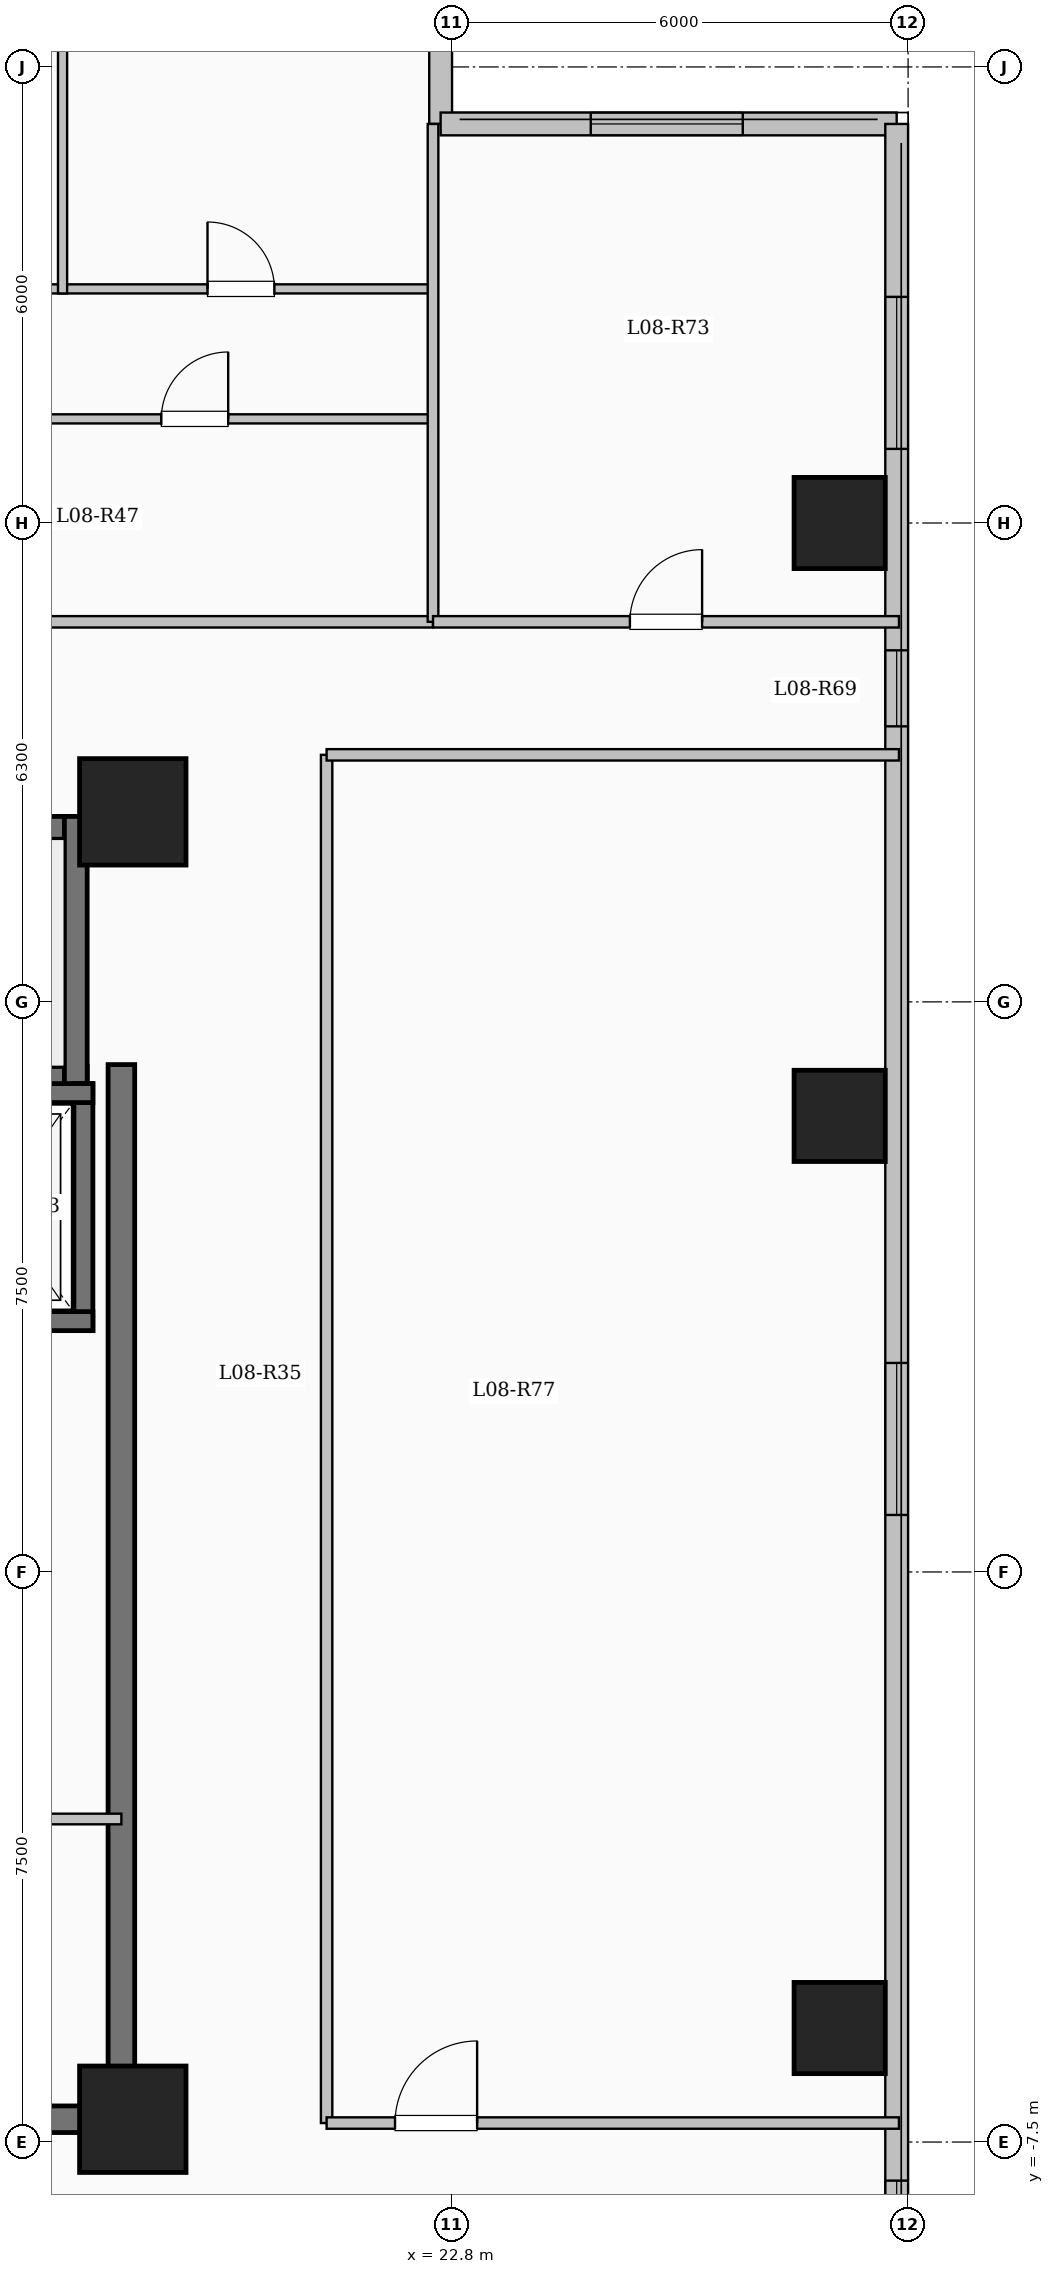
"""IFC4 building model, lengths in metres.
Left out: names, types, materials, properties, quantities, classifications, styles, units other than length and angle.
Written with IfcOpenShell. Run it as: python <this file> out.ifc"""

import sys

from ifc_helpers import new_model, si_unit, direction, frame, frame_2d, origin, origin_2d, place, context, subcontext, project, spatial, rectangle, extrude, element, fill, save


model = new_model("IFC4")
c1 = context("Model", 3, precision=1e-05, world=origin(), true_north=direction((0.0, 1.0)))
c2 = subcontext(c1, "Body", "Model", "MODEL_VIEW")
j1 = project(units=[si_unit("LENGTHUNIT", "METRE"), si_unit("PLANEANGLEUNIT", "RADIAN")], contexts=[c1])
p1 = place(None, origin())
s1 = spatial("IfcSite", under=j1, at=p1, CompositionType="ELEMENT")
p2 = place(p1, origin())
s2 = spatial("IfcBuilding", under=s1, at=p2, CompositionType="ELEMENT")
p3 = place(p2, frame((0.0, 0.0, 34.05)))
s3 = spatial("IfcBuildingStorey", under=s2, at=p3, CompositionType="ELEMENT", Elevation=34.05)
for number, where, z_axis, x_axis in (
    (1, (18.6, -7.2, 0.0), (0.0, 0.0, 1.0), (1.0, 0.0, 0.0)),
    (2, (18.6, 10.0, 0.0), (0.0, 0.0, 1.0), (1.0, 0.0, 0.0)),
):
    element("IfcColumn", number, at=place(p3, frame(where, z_axis=z_axis, x_axis=x_axis)), inside=s3, PredefinedType="COLUMN", context=c2, shape_type="SweptSolid", body=[
        extrude(rectangle(XDim=1.4, YDim=1.4, at=origin_2d()), origin(), (0.0, 0.0, 1.0), 3.35),
    ])
for number, where, z_axis, x_axis in (
    (3, (27.9, -6.0, 0.0), (0.0, 0.0, 1.0), (1.0, 0.0, 0.0)),
    (4, (27.9, 6.0, 0.0), (0.0, 0.0, 1.0), (1.0, 0.0, 0.0)),
    (5, (27.9, 13.8, 0.0), (0.0, 0.0, 1.0), (1.0, 0.0, 0.0)),
):
    element("IfcColumn", number, at=place(p3, frame(where, z_axis=z_axis, x_axis=x_axis)), inside=s3, PredefinedType="COLUMN", context=c2, shape_type="SweptSolid", body=[
        extrude(rectangle(XDim=1.2, YDim=1.2, at=origin_2d()), origin(), (0.0, 0.0, 1.0), 3.35),
    ])
p4 = place(p3, frame((22.65, 23.55, 0.0), z_axis=(0.0, 0.0, 1.0), x_axis=(0.0, -1.0, 0.0)))
e6 = element("IfcWall", 6, at=p4, inside=s3, PredefinedType="SOLIDWALL", context=c2, shape_type="SweptSolid", body=[
    extrude(rectangle(XDim=4.5, YDim=0.3, at=frame_2d((2.25, 0.0))), origin(), (0.0, 0.0, 1.0), 3.1),
])
p5 = place(p4, frame((1.367, 0.0, 0.9)))
e7 = element("IfcOpeningElement", 7, at=p5, cuts=e6, PredefinedType="OPENING", context=c2, shape_type="SweptSolid", body=[
    extrude(rectangle(XDim=1.8, YDim=1.65, at=frame_2d((0.9, 0.825))), frame((0.0, 0.16, 0.0), z_axis=(0.0, -1.0, 0.0), x_axis=(1.0, 0.0, 0.0)), (0.0, 0.0, 1.0), 0.32),
])
p6 = place(p3, frame((22.65, 19.05, 0.0), z_axis=(0.0, 0.0, 1.0), x_axis=(1.0, 0.0, 0.0)))
e8 = element("IfcWall", 8, at=p6, inside=s3, PredefinedType="SOLIDWALL", context=c2, shape_type="SweptSolid", body=[
    extrude(rectangle(XDim=6.0, YDim=0.3, at=frame_2d((3.0, 0.0))), origin(), (0.0, 0.0, 1.0), 3.1),
])
p7 = place(p6, frame((1.975, 0.0, 0.9)))
e9 = element("IfcOpeningElement", 9, at=p7, cuts=e8, PredefinedType="OPENING", context=c2, shape_type="SweptSolid", body=[
    extrude(rectangle(XDim=2.0, YDim=1.7, at=frame_2d((1.0, 0.85))), frame((0.0, 0.16, 0.0), z_axis=(0.0, -1.0, 0.0), x_axis=(1.0, 0.0, 0.0)), (0.0, 0.0, 1.0), 0.32),
])
p8 = place(p3, frame((28.65, 19.05, 0.0), z_axis=(0.0, 0.0, 1.0), x_axis=(0.0, -1.0, 0.0)))
e10 = element("IfcWall", 10, at=p8, inside=s3, PredefinedType="SOLIDWALL", context=c2, shape_type="SweptSolid", body=[
    extrude(rectangle(XDim=38.1, YDim=0.3, at=frame_2d((19.05, 0.0))), origin(), (0.0, 0.0, 1.0), 3.1),
])
p9 = place(p8, frame((2.275, 0.0, 0.9)))
e11 = element("IfcOpeningElement", 11, at=p9, cuts=e10, PredefinedType="OPENING", context=c2, shape_type="SweptSolid", body=[
    extrude(rectangle(XDim=2.0, YDim=1.7, at=frame_2d((1.0, 0.85))), frame((0.0, 0.16, 0.0), z_axis=(0.0, -1.0, 0.0), x_axis=(1.0, 0.0, 0.0)), (0.0, 0.0, 1.0), 0.32),
])
p10 = place(p8, frame((6.925, 0.0, 0.95)))
e12 = element("IfcOpeningElement", 12, at=p10, cuts=e10, PredefinedType="OPENING", context=c2, shape_type="SweptSolid", body=[
    extrude(rectangle(XDim=1.0, YDim=1.5, at=frame_2d((0.5, 0.75))), frame((0.0, 0.16, 0.0), z_axis=(0.0, -1.0, 0.0), x_axis=(1.0, 0.0, 0.0)), (0.0, 0.0, 1.0), 0.32),
])
p11 = place(p8, frame((16.3, 0.0, 0.9)))
e13 = element("IfcOpeningElement", 13, at=p11, cuts=e10, PredefinedType="OPENING", context=c2, shape_type="SweptSolid", body=[
    extrude(rectangle(XDim=2.0, YDim=1.7, at=frame_2d((1.0, 0.85))), frame((0.0, 0.16, 0.0), z_axis=(0.0, -1.0, 0.0), x_axis=(1.0, 0.0, 0.0)), (0.0, 0.0, 1.0), 0.32),
])
p12 = place(p8, frame((27.058, 0.0, 0.9)))
e14 = element("IfcOpeningElement", 14, at=p12, cuts=e10, PredefinedType="OPENING", context=c2, shape_type="SweptSolid", body=[
    extrude(rectangle(XDim=1.5, YDim=1.65, at=frame_2d((0.75, 0.825))), frame((0.0, 0.16, 0.0), z_axis=(0.0, -1.0, 0.0), x_axis=(1.0, 0.0, 0.0)), (0.0, 0.0, 1.0), 0.32),
])
p13 = place(p8, frame((32.55, 0.0, 0.9)))
e15 = element("IfcOpeningElement", 15, at=p13, cuts=e10, PredefinedType="OPENING", context=c2, shape_type="SweptSolid", body=[
    extrude(rectangle(XDim=2.4, YDim=1.8, at=frame_2d((1.2, 0.9))), frame((0.0, 0.16, 0.0), z_axis=(0.0, -1.0, 0.0), x_axis=(1.0, 0.0, 0.0)), (0.0, 0.0, 1.0), 0.32),
])
p14 = place(p3, frame((10.0, 9.79, 0.0), z_axis=(0.0, 0.0, 1.0), x_axis=(1.0, 0.0, 0.0)))
e16 = element("IfcWall", 16, at=p14, inside=s3, PredefinedType="SHEAR", context=c2, shape_type="SweptSolid", body=[
    extrude(rectangle(XDim=8.0, YDim=0.3, at=frame_2d((4.0, 0.0))), origin(), (0.0, 0.0, 1.0), 3.35),
])
p15 = place(p3, frame((10.0, 6.5, 0.0), z_axis=(0.0, 0.0, 1.0), x_axis=(1.0, 0.0, 0.0)))
e17 = element("IfcWall", 17, at=p15, inside=s3, PredefinedType="SHEAR", context=c2, shape_type="SweptSolid", body=[
    extrude(rectangle(XDim=8.0, YDim=0.3, at=frame_2d((4.0, 0.0))), origin(), (0.0, 0.0, 1.0), 3.35),
])
p16 = place(p15, frame((0.55, 0.0, 0.0)))
e18 = element("IfcOpeningElement", 18, at=p16, cuts=e17, PredefinedType="OPENING", context=c2, shape_type="SweptSolid", body=[
    extrude(rectangle(XDim=1.0, YDim=2.15, at=frame_2d((0.5, 1.075))), frame((0.0, 0.16, 0.0), z_axis=(0.0, -1.0, 0.0), x_axis=(1.0, 0.0, 0.0)), (0.0, 0.0, 1.0), 0.32),
])
p17 = place(p3, frame((17.85, 6.35, 0.0), z_axis=(0.0, 0.0, 1.0), x_axis=(0.0, 1.0, 0.0)))
e19 = element("IfcWall", 19, at=p17, inside=s3, PredefinedType="SHEAR", context=c2, shape_type="SweptSolid", body=[
    extrude(rectangle(XDim=3.59, YDim=0.3, at=frame_2d((1.795, 0.0))), origin(), (0.0, 0.0, 1.0), 3.35),
])
p18 = place(p3, frame((17.95, 3.175, 0.0), z_axis=(0.0, 0.0, 1.0), x_axis=(0.0, 1.0, 0.0)))
e20 = element("IfcWall", 20, at=p18, inside=s3, PredefinedType="SHEAR", context=c2, shape_type="SweptSolid", body=[
    extrude(rectangle(XDim=3.25, YDim=0.25, at=frame_2d((1.625, 0.0))), origin(), (0.0, 0.0, 1.0), 3.35),
])
for number, where, z_axis, x_axis in (
    (21, (15.525, 3.3, 0.0), (0.0, 0.0, 1.0), (1.0, 0.0, 0.0)),
    (22, (15.525, 6.3, 0.0), (0.0, 0.0, 1.0), (1.0, 0.0, 0.0)),
):
    element("IfcWall", number, at=place(p3, frame(where, z_axis=z_axis, x_axis=x_axis)), inside=s3, PredefinedType="SHEAR", context=c2, shape_type="SweptSolid", body=[
        extrude(rectangle(XDim=2.55, YDim=0.25, at=frame_2d((1.275, 0.0))), origin(), (0.0, 0.0, 1.0), 3.35),
    ])
p19 = place(p3, frame((18.45, -7.375, 0.0), z_axis=(0.0, 0.0, 1.0), x_axis=(0.0, 1.0, 0.0)))
e23 = element("IfcWall", 23, at=p19, inside=s3, PredefinedType="SHEAR", context=c2, shape_type="SweptSolid", body=[
    extrude(rectangle(XDim=14.05, YDim=0.35, at=frame_2d((7.025, 0.0))), origin(), (0.0, 0.0, 1.0), 3.35),
])
p20 = place(p3, frame((10.075, -7.2, 0.0), z_axis=(0.0, 0.0, 1.0), x_axis=(1.0, 0.0, 0.0)))
e24 = element("IfcWall", 24, at=p20, inside=s3, PredefinedType="SHEAR", context=c2, shape_type="SweptSolid", body=[
    extrude(rectangle(XDim=8.55, YDim=0.35, at=frame_2d((4.275, 0.0))), origin(), (0.0, 0.0, 1.0), 3.35),
])
p21 = place(p3, frame((15.4, -3.25, 0.0), z_axis=(0.0, 0.0, 1.0), x_axis=(1.0, 0.0, 0.0)))
e25 = element("IfcWall", 25, at=p21, inside=s3, PredefinedType="PARTITIONING", context=c2, shape_type="SweptSolid", body=[
    extrude(rectangle(XDim=3.05, YDim=0.14, at=frame_2d((1.525, 0.0))), origin(), (0.0, 0.0, 1.0), 3.1),
])
p22 = place(p21, frame((1.05, 0.0, 0.0)))
e26 = element("IfcOpeningElement", 26, at=p22, cuts=e25, PredefinedType="OPENING", context=c2, shape_type="SweptSolid", body=[
    extrude(rectangle(XDim=0.9, YDim=2.08, at=frame_2d((0.45, 1.04))), frame((0.0, 0.08, 0.0), z_axis=(0.0, -1.0, 0.0), x_axis=(1.0, 0.0, 0.0)), (0.0, 0.0, 1.0), 0.16),
])
p23 = place(p3, frame((3.85, 12.5, 0.0), z_axis=(0.0, 0.0, 1.0), x_axis=(1.0, 0.0, 0.0)))
e27 = element("IfcWall", 27, at=p23, inside=s3, PredefinedType="PARTITIONING", context=c2, shape_type="SweptSolid", body=[
    extrude(rectangle(XDim=18.7, YDim=0.15, at=frame_2d((9.35, 0.0))), origin(), (0.0, 0.0, 1.0), 3.1),
])
p24 = place(p23, frame((0.7, 0.0, 0.0)))
e28 = element("IfcOpeningElement", 28, at=p24, cuts=e27, PredefinedType="OPENING", context=c2, shape_type="SweptSolid", body=[
    extrude(rectangle(XDim=0.96, YDim=2.15, at=frame_2d((0.48, 1.075))), frame((0.0, 0.085, 0.0), z_axis=(0.0, -1.0, 0.0), x_axis=(1.0, 0.0, 0.0)), (0.0, 0.0, 1.0), 0.17),
])
p25 = place(p3, frame((21.15, -7.25, 0.0), z_axis=(0.0, 0.0, 1.0), x_axis=(0.0, 1.0, 0.0)))
e29 = element("IfcWall", 29, at=p25, inside=s3, PredefinedType="PARTITIONING", context=c2, shape_type="SweptSolid", body=[
    extrude(rectangle(XDim=18.0, YDim=0.15, at=frame_2d((9.0, 0.0))), origin(), (0.0, 0.0, 1.0), 2.585),
])
p26 = place(p3, frame((16.28, 15.17, 0.0), z_axis=(0.0, 0.0, 1.0), x_axis=(1.0, 0.0, 0.0)))
e30 = element("IfcWall", 30, at=p26, inside=s3, PredefinedType="PARTITIONING", context=c2, shape_type="SweptSolid", body=[
    extrude(rectangle(XDim=6.27, YDim=0.12, at=frame_2d((3.135, 0.0))), origin(), (0.0, 0.0, 1.0), 3.1),
])
p27 = place(p26, frame((2.695, 0.0, 0.0)))
e31 = element("IfcOpeningElement", 31, at=p27, cuts=e30, PredefinedType="OPENING", context=c2, shape_type="SweptSolid", body=[
    extrude(rectangle(XDim=0.88, YDim=2.1, at=frame_2d((0.44, 1.05))), frame((0.0, 0.07, 0.0), z_axis=(0.0, -1.0, 0.0), x_axis=(1.0, 0.0, 0.0)), (0.0, 0.0, 1.0), 0.14),
])
p28 = place(p3, frame((7.989, 16.88, 0.0), z_axis=(0.0, 0.0, 1.0), x_axis=(1.0, 0.0, 0.0)))
e32 = element("IfcWall", 32, at=p28, inside=s3, PredefinedType="PARTITIONING", context=c2, shape_type="SweptSolid", body=[
    extrude(rectangle(XDim=14.621, YDim=0.12, at=frame_2d((7.311, 0.0))), origin(), (0.0, 0.0, 1.0), 3.1),
])
p29 = place(p28, frame((1.967, 0.0, 0.0)))
e33 = element("IfcOpeningElement", 33, at=p29, cuts=e32, PredefinedType="OPENING", context=c2, shape_type="SweptSolid", body=[
    extrude(rectangle(XDim=0.88, YDim=2.1, at=frame_2d((0.44, 1.05))), frame((0.0, 0.07, 0.0), z_axis=(0.0, -1.0, 0.0), x_axis=(1.0, 0.0, 0.0)), (0.0, 0.0, 1.0), 0.14),
])
p30 = place(p28, frame((6.781, 0.0, 0.0)))
e34 = element("IfcOpeningElement", 34, at=p30, cuts=e32, PredefinedType="OPENING", context=c2, shape_type="SweptSolid", body=[
    extrude(rectangle(XDim=0.88, YDim=2.1, at=frame_2d((0.44, 1.05))), frame((0.0, 0.07, 0.0), z_axis=(0.0, -1.0, 0.0), x_axis=(1.0, 0.0, 0.0)), (0.0, 0.0, 1.0), 0.14),
])
p31 = place(p28, frame((11.594, 0.0, 0.0)))
e35 = element("IfcOpeningElement", 35, at=p31, cuts=e32, PredefinedType="OPENING", context=c2, shape_type="SweptSolid", body=[
    extrude(rectangle(XDim=0.88, YDim=2.1, at=frame_2d((0.44, 1.05))), frame((0.0, 0.07, 0.0), z_axis=(0.0, -1.0, 0.0), x_axis=(1.0, 0.0, 0.0)), (0.0, 0.0, 1.0), 0.14),
])
p32 = place(p3, frame((17.676, 16.82, 0.0), z_axis=(0.0, 0.0, 1.0), x_axis=(0.0, 1.0, 0.0)))
e36 = element("IfcWall", 36, at=p32, inside=s3, PredefinedType="PARTITIONING", context=c2, shape_type="SweptSolid", body=[
    extrude(rectangle(XDim=6.78, YDim=0.12, at=frame_2d((3.39, 0.0))), origin(), (0.0, 0.0, 1.0), 3.1),
])
p33 = place(p3, frame((21.15, -7.25, 0.0), z_axis=(0.0, 0.0, 1.0), x_axis=(1.0, 0.0, 0.0)))
e37 = element("IfcWall", 37, at=p33, inside=s3, PredefinedType="PARTITIONING", context=c2, shape_type="SweptSolid", body=[
    extrude(rectangle(XDim=7.53, YDim=0.15, at=frame_2d((3.765, 0.0))), origin(), (0.0, 0.0, 1.0), 3.1),
])
p34 = place(p33, frame((0.9, 0.0, 0.0)))
e38 = element("IfcOpeningElement", 38, at=p34, cuts=e37, PredefinedType="OPENING", context=c2, shape_type="SweptSolid", body=[
    extrude(rectangle(XDim=1.08, YDim=2.15, at=frame_2d((0.54, 1.075))), frame((0.0, 0.085, 0.0), z_axis=(0.0, -1.0, 0.0), x_axis=(1.0, 0.0, 0.0)), (0.0, 0.0, 1.0), 0.17),
])
p35 = place(p3, frame((21.15, 10.75, 0.0), z_axis=(0.0, 0.0, 1.0), x_axis=(1.0, 0.0, 0.0)))
e39 = element("IfcWall", 39, at=p35, inside=s3, PredefinedType="PARTITIONING", context=c2, shape_type="SweptSolid", body=[
    extrude(rectangle(XDim=7.53, YDim=0.15, at=frame_2d((3.765, 0.0))), origin(), (0.0, 0.0, 1.0), 3.1),
])
p36 = place(p3, frame((22.55, 12.5, 0.0), z_axis=(0.0, 0.0, 1.0), x_axis=(0.0, 1.0, 0.0)))
e40 = element("IfcWall", 40, at=p36, inside=s3, PredefinedType="PARTITIONING", context=c2, shape_type="SweptSolid", body=[
    extrude(rectangle(XDim=6.55, YDim=0.14, at=frame_2d((3.275, 0.0))), origin(), (0.0, 0.0, 1.0), 3.1),
])
p37 = place(p3, frame((22.55, 12.5, 0.0), z_axis=(0.0, 0.0, 1.0), x_axis=(1.0, 0.0, 0.0)))
e41 = element("IfcWall", 41, at=p37, inside=s3, PredefinedType="PARTITIONING", context=c2, shape_type="SweptSolid", body=[
    extrude(rectangle(XDim=6.13, YDim=0.15, at=frame_2d((3.065, 0.0))), origin(), (0.0, 0.0, 1.0), 3.1),
])
p38 = place(p37, frame((2.59, 0.0, 0.0)))
e42 = element("IfcOpeningElement", 42, at=p38, cuts=e41, PredefinedType="OPENING", context=c2, shape_type="SweptSolid", body=[
    extrude(rectangle(XDim=0.95, YDim=2.15, at=frame_2d((0.475, 1.075))), frame((0.0, 0.085, 0.0), z_axis=(0.0, -1.0, 0.0), x_axis=(1.0, 0.0, 0.0)), (0.0, 0.0, 1.0), 0.17),
])
p39 = place(p7, origin())
e43 = element("IfcWindow", 43, at=p39, inside=s3, PartitioningType="SINGLE_PANEL", PredefinedType="WINDOW", context=c2, shape_type="SweptSolid", body=[
    extrude(rectangle(XDim=2.0, YDim=1.7, at=frame_2d((1.0, 0.85))), frame((0.0, 0.03, 0.0), z_axis=(0.0, -1.0, 0.0), x_axis=(1.0, 0.0, 0.0)), (0.0, 0.0, 1.0), 0.06),
])
fill(e9, e43)
p40 = place(p9, origin())
e44 = element("IfcWindow", 44, at=p40, inside=s3, PartitioningType="SINGLE_PANEL", PredefinedType="WINDOW", context=c2, shape_type="SweptSolid", body=[
    extrude(rectangle(XDim=2.0, YDim=1.7, at=frame_2d((1.0, 0.85))), frame((0.0, 0.03, 0.0), z_axis=(0.0, -1.0, 0.0), x_axis=(1.0, 0.0, 0.0)), (0.0, 0.0, 1.0), 0.06),
])
fill(e11, e44)
p41 = place(p10, origin())
e45 = element("IfcWindow", 45, at=p41, inside=s3, PartitioningType="SINGLE_PANEL", PredefinedType="WINDOW", context=c2, shape_type="SweptSolid", body=[
    extrude(rectangle(XDim=1.0, YDim=1.5, at=frame_2d((0.5, 0.75))), frame((0.0, 0.03, 0.0), z_axis=(0.0, -1.0, 0.0), x_axis=(1.0, 0.0, 0.0)), (0.0, 0.0, 1.0), 0.06),
])
fill(e12, e45)
p42 = place(p11, origin())
e46 = element("IfcWindow", 46, at=p42, inside=s3, PartitioningType="SINGLE_PANEL", PredefinedType="WINDOW", context=c2, shape_type="SweptSolid", body=[
    extrude(rectangle(XDim=2.0, YDim=1.7, at=frame_2d((1.0, 0.85))), frame((0.0, 0.03, 0.0), z_axis=(0.0, -1.0, 0.0), x_axis=(1.0, 0.0, 0.0)), (0.0, 0.0, 1.0), 0.06),
])
fill(e13, e46)
p43 = place(p12, origin())
e47 = element("IfcWindow", 47, at=p43, inside=s3, PartitioningType="SINGLE_PANEL", PredefinedType="WINDOW", context=c2, shape_type="SweptSolid", body=[
    extrude(rectangle(XDim=1.5, YDim=1.65, at=frame_2d((0.75, 0.825))), frame((0.0, 0.03, 0.0), z_axis=(0.0, -1.0, 0.0), x_axis=(1.0, 0.0, 0.0)), (0.0, 0.0, 1.0), 0.06),
])
fill(e14, e47)
p44 = place(p27, origin())
e48 = element("IfcDoor", 48, at=p44, inside=s3, OperationType="SINGLE_SWING_RIGHT", PredefinedType="DOOR", context=c2, shape_type="SweptSolid", body=[
    extrude(rectangle(XDim=0.88, YDim=2.1, at=frame_2d((0.44, 1.05))), frame((0.0, 0.025, 0.0), z_axis=(0.0, -1.0, 0.0), x_axis=(1.0, 0.0, 0.0)), (0.0, 0.0, 1.0), 0.05),
])
fill(e31, e48)
p45 = place(p31, origin())
e49 = element("IfcDoor", 49, at=p45, inside=s3, OperationType="SINGLE_SWING_LEFT", PredefinedType="DOOR", context=c2, shape_type="SweptSolid", body=[
    extrude(rectangle(XDim=0.88, YDim=2.1, at=frame_2d((0.44, 1.05))), frame((0.0, 0.025, 0.0), z_axis=(0.0, -1.0, 0.0), x_axis=(1.0, 0.0, 0.0)), (0.0, 0.0, 1.0), 0.05),
])
fill(e35, e49)
p46 = place(p38, origin())
e50 = element("IfcDoor", 50, at=p46, inside=s3, OperationType="SINGLE_SWING_RIGHT", PredefinedType="DOOR", context=c2, shape_type="SweptSolid", body=[
    extrude(rectangle(XDim=0.95, YDim=2.15, at=frame_2d((0.475, 1.075))), frame((0.0, 0.025, 0.0), z_axis=(0.0, -1.0, 0.0), x_axis=(1.0, 0.0, 0.0)), (0.0, 0.0, 1.0), 0.05),
])
fill(e42, e50)
p47 = place(p34, origin())
e51 = element("IfcDoor", 51, at=p47, inside=s3, OperationType="SINGLE_SWING_RIGHT", PredefinedType="DOOR", context=c2, shape_type="SweptSolid", body=[
    extrude(rectangle(XDim=1.08, YDim=2.15, at=frame_2d((0.54, 1.075))), frame((0.0, 0.025, 0.0), z_axis=(0.0, -1.0, 0.0), x_axis=(1.0, 0.0, 0.0)), (0.0, 0.0, 1.0), 0.05),
])
fill(e38, e51)
save(model, sys.argv[1])
